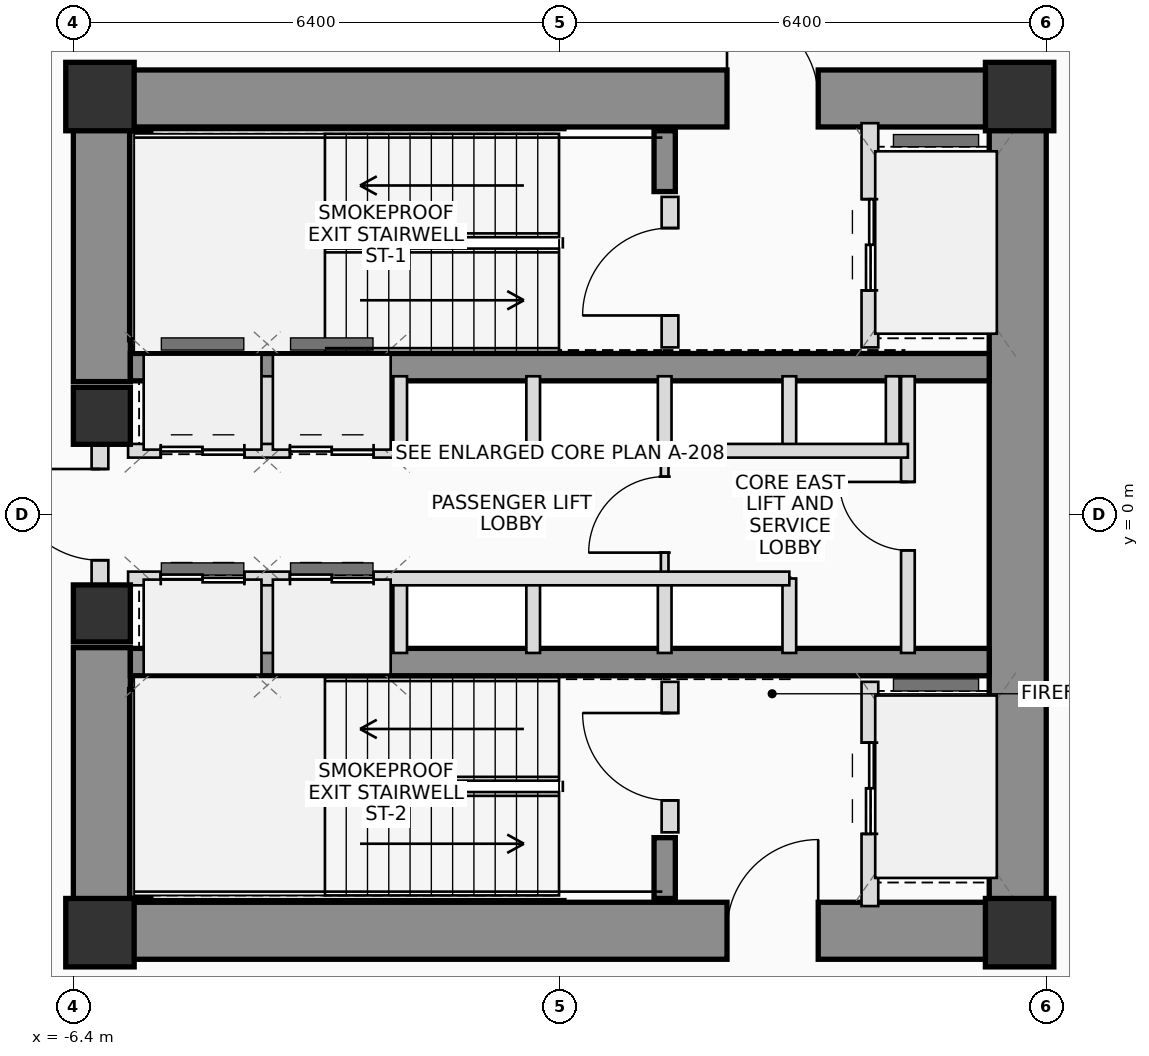
"""IFC4 building model, lengths in metres.
Left out: names, types, materials, properties, quantities, classifications, styles, units other than length and angle.
Written with IfcOpenShell. Run it as: python <this file> out.ifc"""

import sys

from ifc_helpers import new_model, si_unit, direction, frame, frame_2d, origin, origin_2d, place, context, subcontext, project, spatial, rectangle, extrude, source, transform, mapped, element, fill, save


model = new_model("IFC4")
c1 = context("Model", 3, precision=1e-05, world=origin(), true_north=direction((0.0, 1.0)))
c2 = subcontext(c1, "Body", "Model", "MODEL_VIEW")
j1 = project(units=[si_unit("LENGTHUNIT", "METRE"), si_unit("PLANEANGLEUNIT", "RADIAN")], contexts=[c1])
p1 = place(None, origin())
s1 = spatial("IfcSite", under=j1, at=p1, CompositionType="ELEMENT")
p2 = place(p1, origin())
s2 = spatial("IfcBuilding", under=s1, at=p2, CompositionType="ELEMENT")
p3 = place(p2, frame((0.0, 0.0, 81.05)))
s3 = spatial("IfcBuildingStorey", under=s2, at=p3, CompositionType="ELEMENT", Elevation=81.05)
m1 = source(origin(), c2, "Body", "SweptSolid", [
    extrude(rectangle(XDim=0.9, YDim=0.9, at=origin_2d()), origin(), (0.0, 0.0, 1.0), 3.75),
])
for number, where, z_axis, x_axis in (
    (1, (-6.05, -5.5, 0.0), (0.0, 0.0, 1.0), (1.0, 0.0, 0.0)),
    (2, (6.05, -5.5, 0.0), (0.0, 0.0, 1.0), (1.0, 0.0, 0.0)),
    (3, (6.05, 5.5, 0.0), (0.0, 0.0, 1.0), (1.0, 0.0, 0.0)),
    (4, (-6.05, 5.5, 0.0), (0.0, 0.0, 1.0), (1.0, 0.0, 0.0)),
):
    element("IfcColumn", number, at=place(p3, frame(where, z_axis=z_axis, x_axis=x_axis)), inside=s3, PredefinedType="COLUMN", context=c2, shape_type="MappedRepresentation", body=[
        mapped(m1, transform((0.0, 0.0, 0.0), scale=1.0)),
    ])
p4 = place(p3, frame((-6.4, 5.475, 0.0), z_axis=(0.0, 0.0, 1.0), x_axis=(1.0, 0.0, 0.0)))
e5 = element("IfcWall", 5, at=p4, inside=s3, PredefinedType="SHEAR", context=c2, shape_type="SweptSolid", body=[
    extrude(rectangle(XDim=12.8, YDim=0.75, at=frame_2d((6.4, 0.0))), origin(), (0.0, 0.0, 1.0), 3.75),
])
p5 = place(p4, frame((8.6, 0.0, 0.0)))
e6 = element("IfcOpeningElement", 6, at=p5, cuts=e5, PredefinedType="OPENING", context=c2, shape_type="SweptSolid", body=[
    extrude(rectangle(XDim=1.2, YDim=2.2, at=frame_2d((0.6, 1.1))), frame((0.0, 0.385, 0.0), z_axis=(0.0, -1.0, 0.0), x_axis=(1.0, 0.0, 0.0)), (0.0, 0.0, 1.0), 0.77),
])
p6 = place(p3, frame((-6.4, -5.475, 0.0), z_axis=(0.0, 0.0, 1.0), x_axis=(1.0, 0.0, 0.0)))
e7 = element("IfcWall", 7, at=p6, inside=s3, PredefinedType="SHEAR", context=c2, shape_type="SweptSolid", body=[
    extrude(rectangle(XDim=12.8, YDim=0.75, at=frame_2d((6.4, 0.0))), origin(), (0.0, 0.0, 1.0), 3.75),
])
p7 = place(p6, frame((8.6, 0.0, 0.0)))
e8 = element("IfcOpeningElement", 8, at=p7, cuts=e7, PredefinedType="OPENING", context=c2, shape_type="SweptSolid", body=[
    extrude(rectangle(XDim=1.2, YDim=2.2, at=frame_2d((0.6, 1.1))), frame((0.0, 0.385, 0.0), z_axis=(0.0, -1.0, 0.0), x_axis=(1.0, 0.0, 0.0)), (0.0, 0.0, 1.0), 0.77),
])
p8 = place(p3, frame((6.025, -5.1, 0.0), z_axis=(0.0, 0.0, 1.0), x_axis=(0.0, 1.0, 0.0)))
e9 = element("IfcWall", 9, at=p8, inside=s3, PredefinedType="SHEAR", context=c2, shape_type="SweptSolid", body=[
    extrude(rectangle(XDim=10.2, YDim=0.75, at=frame_2d((5.1, 0.0))), origin(), (0.0, 0.0, 1.0), 3.75),
])
for number, where, z_axis, x_axis in (
    (10, (-6.025, -5.1, 0.0), (0.0, 0.0, 1.0), (0.0, 1.0, 0.0)),
    (11, (-6.025, 1.75, 0.0), (0.0, 0.0, 1.0), (0.0, 1.0, 0.0)),
):
    element("IfcWall", number, at=place(p3, frame(where, z_axis=z_axis, x_axis=x_axis)), inside=s3, PredefinedType="SHEAR", context=c2, shape_type="SweptSolid", body=[
        extrude(rectangle(XDim=3.35, YDim=0.75, at=frame_2d((1.675, 0.0))), origin(), (0.0, 0.0, 1.0), 3.75),
    ])
for number, where, z_axis, x_axis in (
    (12, (-5.65, 1.94, 0.0), (0.0, 0.0, 1.0), (1.0, 0.0, 0.0)),
    (13, (-5.65, -1.94, 0.0), (0.0, 0.0, 1.0), (1.0, 0.0, 0.0)),
):
    element("IfcWall", number, at=place(p3, frame(where, z_axis=z_axis, x_axis=x_axis)), inside=s3, PredefinedType="SHEAR", context=c2, shape_type="SweptSolid", body=[
        extrude(rectangle(XDim=11.3, YDim=0.36, at=frame_2d((5.65, 0.0))), origin(), (0.0, 0.0, 1.0), 3.75),
    ])
p9 = place(p3, frame((-5.52, 2.3, 0.0), z_axis=(0.0, 0.0, 1.0), x_axis=(0.0, 1.0, 0.0)))
e14 = element("IfcWall", 14, at=p9, inside=s3, PredefinedType="SHEAR", context=c2, shape_type="SweptSolid", body=[
    extrude(rectangle(XDim=2.75, YDim=0.28, at=frame_2d((1.375, 0.0))), origin(), (0.0, 0.0, 1.0), 3.75),
])
p10 = place(p3, frame((1.38, 4.25, 0.0), z_axis=(0.0, 0.0, 1.0), x_axis=(0.0, 1.0, 0.0)))
e15 = element("IfcWall", 15, at=p10, inside=s3, PredefinedType="SHEAR", context=c2, shape_type="SweptSolid", body=[
    extrude(rectangle(XDim=0.8, YDim=0.28, at=frame_2d((0.4, 0.0))), origin(), (0.0, 0.0, 1.0), 3.75),
])
p11 = place(p3, frame((-5.52, -5.05, 0.0), z_axis=(0.0, 0.0, 1.0), x_axis=(0.0, 1.0, 0.0)))
e16 = element("IfcWall", 16, at=p11, inside=s3, PredefinedType="SHEAR", context=c2, shape_type="SweptSolid", body=[
    extrude(rectangle(XDim=2.75, YDim=0.28, at=frame_2d((1.375, 0.0))), origin(), (0.0, 0.0, 1.0), 3.75),
])
p12 = place(p3, frame((1.38, -5.05, 0.0), z_axis=(0.0, 0.0, 1.0), x_axis=(0.0, 1.0, 0.0)))
e17 = element("IfcWall", 17, at=p12, inside=s3, PredefinedType="SHEAR", context=c2, shape_type="SweptSolid", body=[
    extrude(rectangle(XDim=0.8, YDim=0.28, at=frame_2d((0.4, 0.0))), origin(), (0.0, 0.0, 1.0), 3.75),
])
m2 = source(origin(), c2, "Body", "SweptSolid", [
    extrude(rectangle(XDim=0.75, YDim=0.75, at=origin_2d()), origin(), (0.0, 0.0, 1.0), 3.75),
])
for number, where, z_axis, x_axis in (
    (18, (-6.025, -1.3, 0.0), (0.0, 0.0, 1.0), (1.0, 0.0, 0.0)),
    (19, (-6.025, 1.3, 0.0), (0.0, 0.0, 1.0), (1.0, 0.0, 0.0)),
):
    element("IfcColumn", number, at=place(p3, frame(where, z_axis=z_axis, x_axis=x_axis)), inside=s3, PredefinedType="COLUMN", context=c2, shape_type="MappedRepresentation", body=[
        mapped(m2, transform((0.0, 0.0, 0.0), scale=1.0)),
    ])
p13 = place(p3, frame((-6.05, -0.95, 0.0), z_axis=(0.0, 0.0, 1.0), x_axis=(0.0, 1.0, 0.0)))
e20 = element("IfcWall", 20, at=p13, inside=s3, PredefinedType="PLUMBINGWALL", context=c2, shape_type="SweptSolid", body=[
    extrude(rectangle(XDim=1.9, YDim=0.22, at=frame_2d((0.95, 0.0))), origin(), (0.0, 0.0, 1.0), 2.49),
])
p14 = place(p13, frame((0.35, 0.0, 0.0)))
e21 = element("IfcOpeningElement", 21, at=p14, cuts=e20, PredefinedType="OPENING", context=c2, shape_type="SweptSolid", body=[
    extrude(rectangle(XDim=1.2, YDim=2.2, at=frame_2d((0.6, 1.1))), frame((0.0, 0.12, 0.0), z_axis=(0.0, -1.0, 0.0), x_axis=(1.0, 0.0, 0.0)), (0.0, 0.0, 1.0), 0.24),
])
p15 = place(p3, frame((1.45, 2.2, 0.0), z_axis=(0.0, 0.0, 1.0), x_axis=(0.0, 1.0, 0.0)))
e22 = element("IfcWall", 22, at=p15, inside=s3, PredefinedType="PLUMBINGWALL", context=c2, shape_type="SweptSolid", body=[
    extrude(rectangle(XDim=1.98, YDim=0.22, at=frame_2d((0.99, 0.0))), origin(), (0.0, 0.0, 1.0), 3.51),
])
p16 = place(p15, frame((0.42, 0.0, 0.0)))
e23 = element("IfcOpeningElement", 23, at=p16, cuts=e22, PredefinedType="OPENING", context=c2, shape_type="SweptSolid", body=[
    extrude(rectangle(XDim=1.15, YDim=2.15, at=frame_2d((0.575, 1.075))), frame((0.0, 0.12, 0.0), z_axis=(0.0, -1.0, 0.0), x_axis=(1.0, 0.0, 0.0)), (0.0, 0.0, 1.0), 0.24),
])
p17 = place(p3, frame((4.08, 2.2, 0.0), z_axis=(0.0, 0.0, 1.0), x_axis=(0.0, 1.0, 0.0)))
e24 = element("IfcWall", 24, at=p17, inside=s3, PredefinedType="PLUMBINGWALL", context=c2, shape_type="SweptSolid", body=[
    extrude(rectangle(XDim=2.95, YDim=0.22, at=frame_2d((1.475, 0.0))), origin(), (0.0, 0.0, 1.0), 3.51),
])
p18 = place(p17, frame((0.75, 0.0, 0.0)))
e25 = element("IfcOpeningElement", 25, at=p18, cuts=e24, PredefinedType="OPENING", context=c2, shape_type="SweptSolid", body=[
    extrude(rectangle(XDim=1.2, YDim=2.25, at=frame_2d((0.6, 1.125))), frame((0.0, 0.12, 0.0), z_axis=(0.0, -1.0, 0.0), x_axis=(1.0, 0.0, 0.0)), (0.0, 0.0, 1.0), 0.24),
])
p19 = place(p3, frame((1.45, -4.18, 0.0), z_axis=(0.0, 0.0, 1.0), x_axis=(0.0, 1.0, 0.0)))
e26 = element("IfcWall", 26, at=p19, inside=s3, PredefinedType="PLUMBINGWALL", context=c2, shape_type="SweptSolid", body=[
    extrude(rectangle(XDim=1.98, YDim=0.22, at=frame_2d((0.99, 0.0))), origin(), (0.0, 0.0, 1.0), 3.51),
])
p20 = place(p19, frame((0.42, 0.0, 0.0)))
e27 = element("IfcOpeningElement", 27, at=p20, cuts=e26, PredefinedType="OPENING", context=c2, shape_type="SweptSolid", body=[
    extrude(rectangle(XDim=1.15, YDim=2.15, at=frame_2d((0.575, 1.075))), frame((0.0, 0.12, 0.0), z_axis=(0.0, -1.0, 0.0), x_axis=(1.0, 0.0, 0.0)), (0.0, 0.0, 1.0), 0.24),
])
p21 = place(p3, frame((4.08, -5.15, 0.0), z_axis=(0.0, 0.0, 1.0), x_axis=(0.0, 1.0, 0.0)))
e28 = element("IfcWall", 28, at=p21, inside=s3, PredefinedType="PLUMBINGWALL", context=c2, shape_type="SweptSolid", body=[
    extrude(rectangle(XDim=2.95, YDim=0.22, at=frame_2d((1.475, 0.0))), origin(), (0.0, 0.0, 1.0), 3.51),
])
p22 = place(p21, frame((0.95, 0.0, 0.0)))
e29 = element("IfcOpeningElement", 29, at=p22, cuts=e28, PredefinedType="OPENING", context=c2, shape_type="SweptSolid", body=[
    extrude(rectangle(XDim=1.2, YDim=2.25, at=frame_2d((0.6, 1.125))), frame((0.0, 0.12, 0.0), z_axis=(0.0, -1.0, 0.0), x_axis=(1.0, 0.0, 0.0)), (0.0, 0.0, 1.0), 0.24),
])
p23 = place(p3, frame((1.38, -0.84, 0.0), z_axis=(0.0, 0.0, 1.0), x_axis=(0.0, 1.0, 0.0)))
e30 = element("IfcWall", 30, at=p23, inside=s3, PredefinedType="PARTITIONING", context=c2, shape_type="SweptSolid", body=[
    extrude(rectangle(XDim=1.68, YDim=0.1, at=frame_2d((0.84, 0.0))), origin(), (0.0, 0.0, 1.0), 3.51),
])
p24 = place(p23, frame((0.34, 0.0, 0.0)))
e31 = element("IfcOpeningElement", 31, at=p24, cuts=e30, PredefinedType="OPENING", context=c2, shape_type="SweptSolid", body=[
    extrude(rectangle(XDim=1.0, YDim=2.25, at=frame_2d((0.5, 1.125))), frame((0.0, 0.06, 0.0), z_axis=(0.0, -1.0, 0.0), x_axis=(1.0, 0.0, 0.0)), (0.0, 0.0, 1.0), 0.12),
])
for number, where, z_axis, x_axis in (
    (32, (-3.85, 0.84, 0.0), (0.0, 0.0, 1.0), (0.0, 1.0, 0.0)),
    (33, (-3.85, -1.82, 0.0), (0.0, 0.0, 1.0), (0.0, 1.0, 0.0)),
    (34, (-2.1, 0.84, 0.0), (0.0, 0.0, 1.0), (0.0, 1.0, 0.0)),
    (35, (-2.1, -1.82, 0.0), (0.0, 0.0, 1.0), (0.0, 1.0, 0.0)),
    (36, (-0.35, 0.84, 0.0), (0.0, 0.0, 1.0), (0.0, 1.0, 0.0)),
    (37, (-0.35, -1.82, 0.0), (0.0, 0.0, 1.0), (0.0, 1.0, 0.0)),
    (38, (1.38, 0.84, 0.0), (0.0, 0.0, 1.0), (0.0, 1.0, 0.0)),
    (39, (1.38, -1.82, 0.0), (0.0, 0.0, 1.0), (0.0, 1.0, 0.0)),
    (40, (3.02, 0.84, 0.0), (0.0, 0.0, 1.0), (0.0, 1.0, 0.0)),
    (41, (4.38, 0.84, 0.0), (0.0, 0.0, 1.0), (0.0, 1.0, 0.0)),
    (42, (3.02, -1.82, 0.0), (0.0, 0.0, 1.0), (0.0, 1.0, 0.0)),
):
    element("IfcWall", number, at=place(p3, frame(where, z_axis=z_axis, x_axis=x_axis)), inside=s3, PredefinedType="PLUMBINGWALL", context=c2, shape_type="SweptSolid", body=[
        extrude(rectangle(XDim=0.98, YDim=0.18, at=frame_2d((0.49, 0.0))), origin(), (0.0, 0.0, 1.0), 3.51),
    ])
p25 = place(p3, frame((4.58, -1.82, 0.0), z_axis=(0.0, 0.0, 1.0), x_axis=(0.0, 1.0, 0.0)))
e43 = element("IfcWall", 43, at=p25, inside=s3, PredefinedType="PLUMBINGWALL", context=c2, shape_type="SweptSolid", body=[
    extrude(rectangle(XDim=3.64, YDim=0.18, at=frame_2d((1.82, 0.0))), origin(), (0.0, 0.0, 1.0), 3.51),
])
p26 = place(p25, frame((1.35, 0.0, 0.0)))
e44 = element("IfcOpeningElement", 44, at=p26, cuts=e43, PredefinedType="OPENING", context=c2, shape_type="SweptSolid", body=[
    extrude(rectangle(XDim=0.9, YDim=2.05, at=frame_2d((0.45, 1.025))), frame((0.0, 0.1, 0.0), z_axis=(0.0, -1.0, 0.0), x_axis=(1.0, 0.0, 0.0)), (0.0, 0.0, 1.0), 0.2),
])
p27 = place(p3, frame((-5.68, 0.84, 0.0), z_axis=(0.0, 0.0, 1.0), x_axis=(1.0, 0.0, 0.0)))
e45 = element("IfcWall", 45, at=p27, inside=s3, PredefinedType="PLUMBINGWALL", context=c2, shape_type="SweptSolid", body=[
    extrude(rectangle(XDim=10.26, YDim=0.18, at=frame_2d((5.13, 0.0))), origin(), (0.0, 0.0, 1.0), 3.51),
])
p28 = place(p27, frame((0.43, 0.0, 0.0)))
e46 = element("IfcOpeningElement", 46, at=p28, cuts=e45, PredefinedType="OPENING", context=c2, shape_type="SweptSolid", body=[
    extrude(rectangle(XDim=1.1, YDim=2.2, at=frame_2d((0.55, 1.1))), frame((0.0, 0.1, 0.0), z_axis=(0.0, -1.0, 0.0), x_axis=(1.0, 0.0, 0.0)), (0.0, 0.0, 1.0), 0.2),
])
p29 = place(p27, frame((2.13, 0.0, 0.0)))
e47 = element("IfcOpeningElement", 47, at=p29, cuts=e45, PredefinedType="OPENING", context=c2, shape_type="SweptSolid", body=[
    extrude(rectangle(XDim=1.1, YDim=2.2, at=frame_2d((0.55, 1.1))), frame((0.0, 0.1, 0.0), z_axis=(0.0, -1.0, 0.0), x_axis=(1.0, 0.0, 0.0)), (0.0, 0.0, 1.0), 0.2),
])
p30 = place(p3, frame((-5.68, -0.84, 0.0), z_axis=(0.0, 0.0, 1.0), x_axis=(1.0, 0.0, 0.0)))
e48 = element("IfcWall", 48, at=p30, inside=s3, PredefinedType="PLUMBINGWALL", context=c2, shape_type="SweptSolid", body=[
    extrude(rectangle(XDim=8.7, YDim=0.18, at=frame_2d((4.35, 0.0))), origin(), (0.0, 0.0, 1.0), 3.51),
])
p31 = place(p30, frame((0.43, 0.0, 0.0)))
e49 = element("IfcOpeningElement", 49, at=p31, cuts=e48, PredefinedType="OPENING", context=c2, shape_type="SweptSolid", body=[
    extrude(rectangle(XDim=1.1, YDim=2.2, at=frame_2d((0.55, 1.1))), frame((0.0, 0.1, 0.0), z_axis=(0.0, -1.0, 0.0), x_axis=(1.0, 0.0, 0.0)), (0.0, 0.0, 1.0), 0.2),
])
p32 = place(p30, frame((2.13, 0.0, 0.0)))
e50 = element("IfcOpeningElement", 50, at=p32, cuts=e48, PredefinedType="OPENING", context=c2, shape_type="SweptSolid", body=[
    extrude(rectangle(XDim=1.1, YDim=2.2, at=frame_2d((0.55, 1.1))), frame((0.0, 0.1, 0.0), z_axis=(0.0, -1.0, 0.0), x_axis=(1.0, 0.0, 0.0)), (0.0, 0.0, 1.0), 0.2),
])
p33 = place(p5, origin())
e51 = element("IfcDoor", 51, at=p33, inside=s3, OperationType="SINGLE_SWING_LEFT", PredefinedType="DOOR", context=c2, shape_type="SweptSolid", body=[
    extrude(rectangle(XDim=1.2, YDim=2.2, at=frame_2d((0.6, 1.1))), frame((0.0, 0.025, 0.0), z_axis=(0.0, -1.0, 0.0), x_axis=(1.0, 0.0, 0.0)), (0.0, 0.0, 1.0), 0.05),
])
fill(e6, e51)
p34 = place(p7, origin())
e52 = element("IfcDoor", 52, at=p34, inside=s3, OperationType="SINGLE_SWING_RIGHT", PredefinedType="DOOR", context=c2, shape_type="SweptSolid", body=[
    extrude(rectangle(XDim=1.2, YDim=2.2, at=frame_2d((0.6, 1.1))), frame((0.0, 0.025, 0.0), z_axis=(0.0, -1.0, 0.0), x_axis=(1.0, 0.0, 0.0)), (0.0, 0.0, 1.0), 0.05),
])
fill(e8, e52)
p35 = place(p14, origin())
e53 = element("IfcDoor", 53, at=p35, inside=s3, OperationType="SINGLE_SWING_RIGHT", PredefinedType="DOOR", context=c2, shape_type="SweptSolid", body=[
    extrude(rectangle(XDim=1.2, YDim=2.2, at=frame_2d((0.6, 1.1))), frame((0.0, 0.025, 0.0), z_axis=(0.0, -1.0, 0.0), x_axis=(1.0, 0.0, 0.0)), (0.0, 0.0, 1.0), 0.05),
])
fill(e21, e53)
p36 = place(p16, origin())
e54 = element("IfcDoor", 54, at=p36, inside=s3, OperationType="SINGLE_SWING_LEFT", PredefinedType="DOOR", context=c2, shape_type="SweptSolid", body=[
    extrude(rectangle(XDim=1.15, YDim=2.15, at=frame_2d((0.575, 1.075))), frame((0.0, 0.025, 0.0), z_axis=(0.0, -1.0, 0.0), x_axis=(1.0, 0.0, 0.0)), (0.0, 0.0, 1.0), 0.05),
])
fill(e23, e54)
p37 = place(p18, origin())
e55 = element("IfcDoor", 55, at=p37, inside=s3, OperationType="DOUBLE_DOOR_SLIDING", PredefinedType="DOOR", context=c2, shape_type="SweptSolid", body=[
    extrude(rectangle(XDim=1.2, YDim=2.25, at=frame_2d((0.6, 1.125))), frame((0.0, 0.025, 0.0), z_axis=(0.0, -1.0, 0.0), x_axis=(1.0, 0.0, 0.0)), (0.0, 0.0, 1.0), 0.05),
])
fill(e25, e55)
p38 = place(p20, origin())
e56 = element("IfcDoor", 56, at=p38, inside=s3, OperationType="SINGLE_SWING_RIGHT", PredefinedType="DOOR", context=c2, shape_type="SweptSolid", body=[
    extrude(rectangle(XDim=1.15, YDim=2.15, at=frame_2d((0.575, 1.075))), frame((0.0, 0.025, 0.0), z_axis=(0.0, -1.0, 0.0), x_axis=(1.0, 0.0, 0.0)), (0.0, 0.0, 1.0), 0.05),
])
fill(e27, e56)
p39 = place(p22, origin())
e57 = element("IfcDoor", 57, at=p39, inside=s3, OperationType="DOUBLE_DOOR_SLIDING", PredefinedType="DOOR", context=c2, shape_type="SweptSolid", body=[
    extrude(rectangle(XDim=1.2, YDim=2.25, at=frame_2d((0.6, 1.125))), frame((0.0, 0.025, 0.0), z_axis=(0.0, -1.0, 0.0), x_axis=(1.0, 0.0, 0.0)), (0.0, 0.0, 1.0), 0.05),
])
fill(e29, e57)
p40 = place(p24, origin())
e58 = element("IfcDoor", 58, at=p40, inside=s3, OperationType="SINGLE_SWING_LEFT", PredefinedType="DOOR", context=c2, shape_type="SweptSolid", body=[
    extrude(rectangle(XDim=1.0, YDim=2.25, at=frame_2d((0.5, 1.125))), frame((0.0, 0.025, 0.0), z_axis=(0.0, -1.0, 0.0), x_axis=(1.0, 0.0, 0.0)), (0.0, 0.0, 1.0), 0.05),
])
fill(e31, e58)
p41 = place(p26, origin())
e59 = element("IfcDoor", 59, at=p41, inside=s3, OperationType="SINGLE_SWING_RIGHT", PredefinedType="DOOR", context=c2, shape_type="SweptSolid", body=[
    extrude(rectangle(XDim=0.9, YDim=2.05, at=frame_2d((0.45, 1.025))), frame((0.0, 0.025, 0.0), z_axis=(0.0, -1.0, 0.0), x_axis=(1.0, 0.0, 0.0)), (0.0, 0.0, 1.0), 0.05),
])
fill(e44, e59)
p42 = place(p28, origin())
e60 = element("IfcDoor", 60, at=p42, inside=s3, OperationType="DOUBLE_DOOR_SLIDING", PredefinedType="DOOR", context=c2, shape_type="SweptSolid", body=[
    extrude(rectangle(XDim=1.1, YDim=2.2, at=frame_2d((0.55, 1.1))), frame((0.0, 0.025, 0.0), z_axis=(0.0, -1.0, 0.0), x_axis=(1.0, 0.0, 0.0)), (0.0, 0.0, 1.0), 0.05),
])
fill(e46, e60)
p43 = place(p29, origin())
e61 = element("IfcDoor", 61, at=p43, inside=s3, OperationType="DOUBLE_DOOR_SLIDING", PredefinedType="DOOR", context=c2, shape_type="SweptSolid", body=[
    extrude(rectangle(XDim=1.1, YDim=2.2, at=frame_2d((0.55, 1.1))), frame((0.0, 0.025, 0.0), z_axis=(0.0, -1.0, 0.0), x_axis=(1.0, 0.0, 0.0)), (0.0, 0.0, 1.0), 0.05),
])
fill(e47, e61)
p44 = place(p31, origin())
e62 = element("IfcDoor", 62, at=p44, inside=s3, OperationType="DOUBLE_DOOR_SLIDING", PredefinedType="DOOR", context=c2, shape_type="SweptSolid", body=[
    extrude(rectangle(XDim=1.1, YDim=2.2, at=frame_2d((0.55, 1.1))), frame((0.0, 0.025, 0.0), z_axis=(0.0, -1.0, 0.0), x_axis=(1.0, 0.0, 0.0)), (0.0, 0.0, 1.0), 0.05),
])
fill(e49, e62)
p45 = place(p32, origin())
e63 = element("IfcDoor", 63, at=p45, inside=s3, OperationType="DOUBLE_DOOR_SLIDING", PredefinedType="DOOR", context=c2, shape_type="SweptSolid", body=[
    extrude(rectangle(XDim=1.1, YDim=2.2, at=frame_2d((0.55, 1.1))), frame((0.0, 0.025, 0.0), z_axis=(0.0, -1.0, 0.0), x_axis=(1.0, 0.0, 0.0)), (0.0, 0.0, 1.0), 0.05),
])
fill(e50, e63)
save(model, sys.argv[1])
